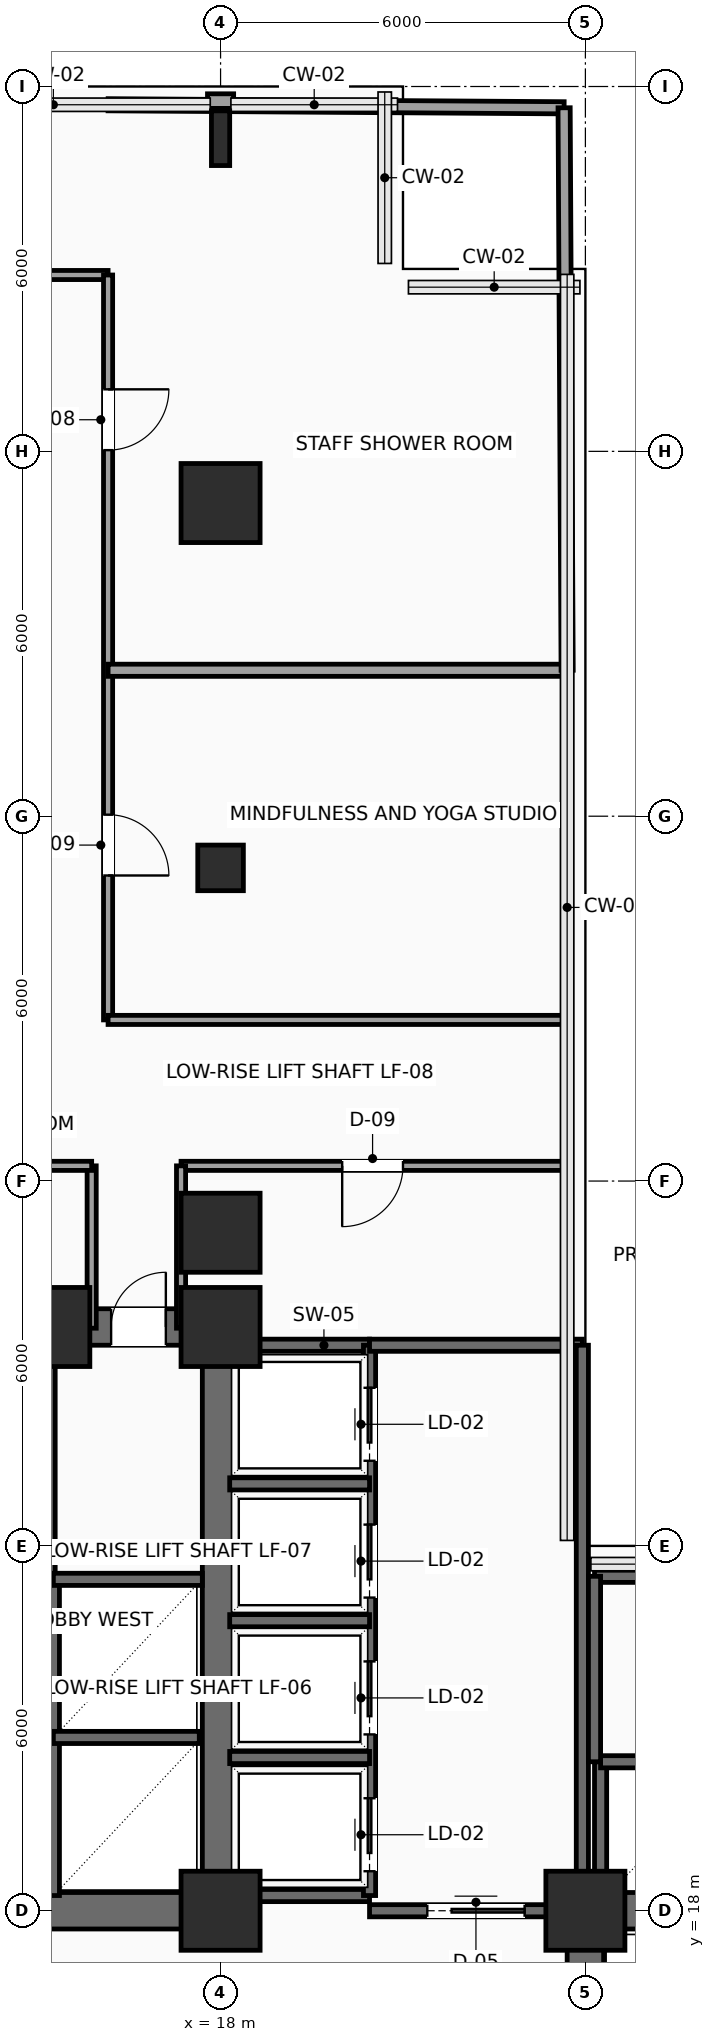
"""IFC4 building model, lengths in metres.
Left out: names, types, materials, properties, quantities, classifications, styles, units other than length and angle.
Written with IfcOpenShell. Run it as: python <this file> out.ifc"""

import sys

from ifc_helpers import new_model, si_unit, direction, frame, frame_2d, origin, origin_2d, place, context, subcontext, project, spatial, rectangle, hollow_rectangle, i_section, extrude, element, fill, save


model = new_model("IFC4")
c1 = context("Model", 3, precision=1e-05, world=origin(), true_north=direction((0.0, 1.0)))
c2 = subcontext(c1, "Body", "Model", "MODEL_VIEW")
j1 = project(units=[si_unit("LENGTHUNIT", "METRE"), si_unit("PLANEANGLEUNIT", "RADIAN")], contexts=[c1])
p1 = place(None, origin())
s1 = spatial("IfcSite", under=j1, at=p1, CompositionType="ELEMENT")
p2 = place(p1, origin())
s2 = spatial("IfcBuilding", under=s1, at=p2, CompositionType="ELEMENT")
p3 = place(p2, frame((0.0, 0.0, 75.3)))
s3 = spatial("IfcBuildingStorey", under=s2, at=p3, CompositionType="ELEMENT", Elevation=75.3)
for number, where, z_axis, x_axis in (
    (1, (18.0, 18.0, 0.0), (0.0, 0.0, 1.0), (1.0, 0.0, 0.0)),
    (2, (15.2, 27.6, 0.0), (0.0, 0.0, 1.0), (1.0, 0.0, 0.0)),
    (3, (18.0, 27.6, 0.0), (0.0, 0.0, 1.0), (1.0, 0.0, 0.0)),
    (4, (24.0, 18.0, 0.0), (0.0, 0.0, 1.0), (1.0, 0.0, 0.0)),
    (5, (18.0, 29.15, 0.0), (0.0, 0.0, 1.0), (1.0, 0.0, 0.0)),
):
    element("IfcColumn", number, at=place(p3, frame(where, z_axis=z_axis, x_axis=x_axis)), inside=s3, PredefinedType="COLUMN", context=c2, shape_type="SweptSolid", body=[
        extrude(rectangle(XDim=1.3, YDim=1.3, at=origin_2d()), origin(), (0.0, 0.0, 1.0), 3.9),
    ])
p4 = place(p3, frame((18.0, 35.15, 0.0), z_axis=(0.0, 0.0, 1.0), x_axis=(1.0, 0.0, 0.0)))
e6 = element("IfcColumn", 6, at=p4, inside=s3, PredefinedType="COLUMN", context=c2, shape_type="SweptSolid", body=[
    extrude(hollow_rectangle(XDim=0.75, YDim=0.75, WallThickness=0.035, InnerFilletRadius=0.035, OuterFilletRadius=0.05, at=origin_2d()), origin(), (0.0, 0.0, 1.0), 3.9),
])
p5 = place(p3, frame((18.0, 41.15, 0.0), z_axis=(0.0, 0.0, 1.0), x_axis=(1.0, 0.0, 0.0)))
e7 = element("IfcColumn", 7, at=p5, inside=s3, PredefinedType="COLUMN", context=c2, shape_type="SweptSolid", body=[
    extrude(rectangle(XDim=1.3, YDim=1.3, at=origin_2d()), origin(), (0.0, 0.0, 1.0), 3.9),
])
p6 = place(p3, frame((18.0, 47.15, 0.0), z_axis=(0.0, 0.0, 1.0), x_axis=(1.0, 0.0, 0.0)))
e8 = element("IfcColumn", 8, at=p6, inside=s3, PredefinedType="COLUMN", context=c2, shape_type="SweptSolid", body=[
    extrude(i_section(OverallWidth=0.3, OverallDepth=0.9, WebThickness=0.019, FlangeThickness=0.035, FilletRadius=0.03, at=origin_2d()), origin(), (0.0, 0.0, 1.0), 3.9),
])
p7 = place(p3, frame((17.785, 47.76, 0.0), z_axis=(0.0, 0.0, 1.0), x_axis=(1.0, 0.0, 0.0)))
e9 = element("IfcWall", 9, at=p7, inside=s3, PredefinedType="SOLIDWALL", context=c2, shape_type="SweptSolid", body=[
    extrude(rectangle(XDim=0.43, YDim=0.24, at=frame_2d((0.215, 0.0))), origin(), (0.0, 0.0, 1.0), 3.65),
])
p8 = place(p3, frame((6.0, 18.0, 0.0), z_axis=(0.0, 0.0, 1.0), x_axis=(1.0, 0.0, 0.0)))
e10 = element("IfcWall", 10, at=p8, inside=s3, PredefinedType="SHEAR", context=c2, shape_type="SweptSolid", body=[
    extrude(rectangle(XDim=12.0, YDim=0.6, at=frame_2d((6.0, 0.0))), origin(), (0.0, 0.0, 1.0), 3.65),
])
p9 = place(p8, frame((7.15, 0.0, 0.0)))
e11 = element("IfcOpeningElement", 11, at=p9, cuts=e10, PredefinedType="OPENING", context=c2, shape_type="SweptSolid", body=[
    extrude(rectangle(XDim=1.6, YDim=2.3, at=frame_2d((0.8, 1.15))), frame((0.0, 0.31, 0.0), z_axis=(0.0, -1.0, 0.0), x_axis=(1.0, 0.0, 0.0)), (0.0, 0.0, 1.0), 0.62),
])
p10 = place(p3, frame((6.0, 27.6, 0.0), z_axis=(0.0, 0.0, 1.0), x_axis=(1.0, 0.0, 0.0)))
e12 = element("IfcWall", 12, at=p10, inside=s3, PredefinedType="SHEAR", context=c2, shape_type="SweptSolid", body=[
    extrude(rectangle(XDim=12.0, YDim=0.6, at=frame_2d((6.0, 0.0))), origin(), (0.0, 0.0, 1.0), 3.65),
])
p11 = place(p10, frame((10.2, 0.0, 0.0)))
e13 = element("IfcOpeningElement", 13, at=p11, cuts=e12, PredefinedType="OPENING", context=c2, shape_type="SweptSolid", body=[
    extrude(rectangle(XDim=0.9, YDim=2.15, at=frame_2d((0.45, 1.075))), frame((0.0, 0.31, 0.0), z_axis=(0.0, -1.0, 0.0), x_axis=(1.0, 0.0, 0.0)), (0.0, 0.0, 1.0), 0.62),
])
for number, where, z_axis, x_axis in (
    (14, (18.0, 18.0, 0.0), (0.0, 0.0, 1.0), (0.0, 1.0, 0.0)),
    (15, (24.0, 18.0, 0.0), (0.0, 0.0, 1.0), (1.0, 0.0, 0.0)),
):
    element("IfcWall", number, at=place(p3, frame(where, z_axis=z_axis, x_axis=x_axis)), inside=s3, PredefinedType="SHEAR", context=c2, shape_type="SweptSolid", body=[
        extrude(rectangle(XDim=9.6, YDim=0.6, at=frame_2d((4.8, 0.0))), origin(), (0.0, 0.0, 1.0), 3.65),
    ])
p12 = place(p3, frame((24.0, 6.0, 0.0), z_axis=(0.0, 0.0, 1.0), x_axis=(0.0, 1.0, 0.0)))
e16 = element("IfcWall", 16, at=p12, inside=s3, PredefinedType="SHEAR", context=c2, shape_type="SweptSolid", body=[
    extrude(rectangle(XDim=12.0, YDim=0.6, at=frame_2d((6.0, 0.0))), origin(), (0.0, 0.0, 1.0), 3.65),
])
p13 = place(p12, frame((7.15, 0.0, 0.0)))
e17 = element("IfcOpeningElement", 17, at=p13, cuts=e16, PredefinedType="OPENING", context=c2, shape_type="SweptSolid", body=[
    extrude(rectangle(XDim=1.6, YDim=2.3, at=frame_2d((0.8, 1.15))), frame((0.0, 0.31, 0.0), z_axis=(0.0, -1.0, 0.0), x_axis=(1.0, 0.0, 0.0)), (0.0, 0.0, 1.0), 0.62),
])
p14 = place(p3, frame((15.18, 23.26, 0.0), z_axis=(0.0, 0.0, 1.0), x_axis=(0.0, 1.0, 0.0)))
e18 = element("IfcWall", 18, at=p14, inside=s3, PredefinedType="SHEAR", context=c2, shape_type="SweptSolid", body=[
    extrude(rectangle(XDim=4.04, YDim=0.2, at=frame_2d((2.02, 0.0))), origin(), (0.0, 0.0, 1.0), 3.65),
])
p15 = place(p3, frame((15.25, 18.25, 0.0), z_axis=(0.0, 0.0, 1.0), x_axis=(0.0, 1.0, 0.0)))
e19 = element("IfcWall", 19, at=p15, inside=s3, PredefinedType="SHEAR", context=c2, shape_type="SweptSolid", body=[
    extrude(rectangle(XDim=5.2, YDim=0.2, at=frame_2d((2.6, 0.0))), origin(), (0.0, 0.0, 1.0), 3.65),
])
p16 = place(p3, frame((15.25, 20.85, 0.0), z_axis=(0.0, 0.0, 1.0), x_axis=(1.0, 0.0, 0.0)))
e20 = element("IfcWall", 20, at=p16, inside=s3, PredefinedType="SHEAR", context=c2, shape_type="SweptSolid", body=[
    extrude(rectangle(XDim=2.4, YDim=0.2, at=frame_2d((1.2, 0.0))), origin(), (0.0, 0.0, 1.0), 3.65),
])
p17 = place(p3, frame((15.25, 23.45, 0.0), z_axis=(0.0, 0.0, 1.0), x_axis=(1.0, 0.0, 0.0)))
e21 = element("IfcWall", 21, at=p17, inside=s3, PredefinedType="SHEAR", context=c2, shape_type="SweptSolid", body=[
    extrude(rectangle(XDim=2.45, YDim=0.2, at=frame_2d((1.225, 0.0))), origin(), (0.0, 0.0, 1.0), 3.65),
])
for number, where, z_axis, x_axis in (
    (22, (18.1, 27.3, 0.0), (0.0, 0.0, 1.0), (1.0, 0.0, 0.0)),
    (23, (18.1, 18.25, 0.0), (0.0, 0.0, 1.0), (1.0, 0.0, 0.0)),
):
    element("IfcWall", number, at=place(p3, frame(where, z_axis=z_axis, x_axis=x_axis)), inside=s3, PredefinedType="SHEAR", context=c2, shape_type="SweptSolid", body=[
        extrude(rectangle(XDim=2.35, YDim=0.2, at=frame_2d((1.175, 0.0))), origin(), (0.0, 0.0, 1.0), 3.65),
    ])
p18 = place(p3, frame((20.45, 18.25, 0.0), z_axis=(0.0, 0.0, 1.0), x_axis=(0.0, 1.0, 0.0)))
e24 = element("IfcWall", 24, at=p18, inside=s3, PredefinedType="SHEAR", context=c2, shape_type="SweptSolid", body=[
    extrude(rectangle(XDim=9.05, YDim=0.2, at=frame_2d((4.525, 0.0))), origin(), (0.0, 0.0, 1.0), 3.65),
])
p19 = place(p18, frame((0.4, 0.0, 0.0)))
e25 = element("IfcOpeningElement", 25, at=p19, cuts=e24, PredefinedType="OPENING", context=c2, shape_type="SweptSolid", body=[
    extrude(rectangle(XDim=1.2, YDim=2.2, at=frame_2d((0.6, 1.1))), frame((0.0, 0.11, 0.0), z_axis=(0.0, -1.0, 0.0), x_axis=(1.0, 0.0, 0.0)), (0.0, 0.0, 1.0), 0.22),
])
p20 = place(p18, frame((2.65, 0.0, 0.0)))
e26 = element("IfcOpeningElement", 26, at=p20, cuts=e24, PredefinedType="OPENING", context=c2, shape_type="SweptSolid", body=[
    extrude(rectangle(XDim=1.2, YDim=2.2, at=frame_2d((0.6, 1.1))), frame((0.0, 0.11, 0.0), z_axis=(0.0, -1.0, 0.0), x_axis=(1.0, 0.0, 0.0)), (0.0, 0.0, 1.0), 0.22),
])
p21 = place(p18, frame((4.9, 0.0, 0.0)))
e27 = element("IfcOpeningElement", 27, at=p21, cuts=e24, PredefinedType="OPENING", context=c2, shape_type="SweptSolid", body=[
    extrude(rectangle(XDim=1.2, YDim=2.2, at=frame_2d((0.6, 1.1))), frame((0.0, 0.11, 0.0), z_axis=(0.0, -1.0, 0.0), x_axis=(1.0, 0.0, 0.0)), (0.0, 0.0, 1.0), 0.22),
])
p22 = place(p18, frame((7.15, 0.0, 0.0)))
e28 = element("IfcOpeningElement", 28, at=p22, cuts=e24, PredefinedType="OPENING", context=c2, shape_type="SweptSolid", body=[
    extrude(rectangle(XDim=1.2, YDim=2.2, at=frame_2d((0.6, 1.1))), frame((0.0, 0.11, 0.0), z_axis=(0.0, -1.0, 0.0), x_axis=(1.0, 0.0, 0.0)), (0.0, 0.0, 1.0), 0.22),
])
for number, where, z_axis, x_axis in (
    (29, (18.15, 20.52, 0.0), (0.0, 0.0, 1.0), (1.0, 0.0, 0.0)),
    (30, (18.15, 22.77, 0.0), (0.0, 0.0, 1.0), (1.0, 0.0, 0.0)),
    (31, (18.15, 25.02, 0.0), (0.0, 0.0, 1.0), (1.0, 0.0, 0.0)),
):
    element("IfcWall", number, at=place(p3, frame(where, z_axis=z_axis, x_axis=x_axis)), inside=s3, PredefinedType="SHEAR", context=c2, shape_type="SweptSolid", body=[
        extrude(rectangle(XDim=2.3, YDim=0.2, at=frame_2d((1.15, 0.0))), origin(), (0.0, 0.0, 1.0), 3.65),
    ])
p23 = place(p3, frame((20.45, 18.0, 0.0), z_axis=(0.0, 0.0, 1.0), x_axis=(1.0, 0.0, 0.0)))
e32 = element("IfcWall", 32, at=p23, inside=s3, PredefinedType="SHEAR", context=c2, shape_type="SweptSolid", body=[
    extrude(rectangle(XDim=3.5, YDim=0.2, at=frame_2d((1.75, 0.0))), origin(), (0.0, 0.0, 1.0), 3.65),
])
p24 = place(p23, frame((0.95, 0.0, 0.0)))
e33 = element("IfcOpeningElement", 33, at=p24, cuts=e32, PredefinedType="OPENING", context=c2, shape_type="SweptSolid", body=[
    extrude(rectangle(XDim=1.6, YDim=2.3, at=frame_2d((0.8, 1.15))), frame((0.0, 0.11, 0.0), z_axis=(0.0, -1.0, 0.0), x_axis=(1.0, 0.0, 0.0)), (0.0, 0.0, 1.0), 0.22),
])
p25 = place(p3, frame((20.45, 27.3, 0.0), z_axis=(0.0, 0.0, 1.0), x_axis=(1.0, 0.0, 0.0)))
e34 = element("IfcWall", 34, at=p25, inside=s3, PredefinedType="SHEAR", context=c2, shape_type="SweptSolid", body=[
    extrude(rectangle(XDim=3.5, YDim=0.2, at=frame_2d((1.75, 0.0))), origin(), (0.0, 0.0, 1.0), 3.65),
])
p26 = place(p3, frame((23.95, 18.0, 0.0), z_axis=(0.0, 0.0, 1.0), x_axis=(0.0, 1.0, 0.0)))
e35 = element("IfcWall", 35, at=p26, inside=s3, PredefinedType="SHEAR", context=c2, shape_type="SweptSolid", body=[
    extrude(rectangle(XDim=9.3, YDim=0.2, at=frame_2d((4.65, 0.0))), origin(), (0.0, 0.0, 1.0), 3.65),
])
p27 = place(p3, frame((24.25, 18.1, 0.0), z_axis=(0.0, 0.0, 1.0), x_axis=(0.0, 1.0, 0.0)))
e36 = element("IfcWall", 36, at=p27, inside=s3, PredefinedType="SHEAR", context=c2, shape_type="SweptSolid", body=[
    extrude(rectangle(XDim=2.35, YDim=0.2, at=frame_2d((1.175, 0.0))), origin(), (0.0, 0.0, 1.0), 3.65),
])
p28 = place(p3, frame((24.25, 20.45, 0.0), z_axis=(0.0, 0.0, 1.0), x_axis=(1.0, 0.0, 0.0)))
e37 = element("IfcWall", 37, at=p28, inside=s3, PredefinedType="SHEAR", context=c2, shape_type="SweptSolid", body=[
    extrude(rectangle(XDim=9.05, YDim=0.2, at=frame_2d((4.525, 0.0))), origin(), (0.0, 0.0, 1.0), 3.65),
])
p29 = place(p3, frame((24.15, 23.5, 0.0), z_axis=(0.0, 0.0, 1.0), x_axis=(1.0, 0.0, 0.0)))
e38 = element("IfcWall", 38, at=p29, inside=s3, PredefinedType="SHEAR", context=c2, shape_type="SweptSolid", body=[
    extrude(rectangle(XDim=9.15, YDim=0.2, at=frame_2d((4.575, 0.0))), origin(), (0.0, 0.0, 1.0), 3.65),
])
p30 = place(p3, frame((24.15, 20.45, 0.0), z_axis=(0.0, 0.0, 1.0), x_axis=(0.0, 1.0, 0.0)))
e39 = element("IfcWall", 39, at=p30, inside=s3, PredefinedType="SHEAR", context=c2, shape_type="SweptSolid", body=[
    extrude(rectangle(XDim=3.05, YDim=0.2, at=frame_2d((1.525, 0.0))), origin(), (0.0, 0.0, 1.0), 3.65),
])
p31 = place(p3, frame((13.8, 44.9, 0.0), z_axis=(0.0, 0.0, 1.0), x_axis=(1.0, 0.0, 0.0)))
e40 = element("IfcWall", 40, at=p31, inside=s3, PredefinedType="PARTITIONING", context=c2, shape_type="SweptSolid", body=[
    extrude(rectangle(XDim=2.35, YDim=0.15, at=frame_2d((1.175, 0.0))), origin(), (0.0, 0.0, 1.0), 3.65),
])
p32 = place(p3, frame((16.15, 44.9, 0.0), z_axis=(0.0, 0.0, 1.0), x_axis=(0.0, -1.0, 0.0)))
e41 = element("IfcWall", 41, at=p32, inside=s3, PredefinedType="PARTITIONING", context=c2, shape_type="SweptSolid", body=[
    extrude(rectangle(XDim=12.25, YDim=0.15, at=frame_2d((6.125, 0.0))), origin(), (0.0, 0.0, 1.0), 3.65),
])
p33 = place(p32, frame((8.875, 0.0, 0.0)))
e42 = element("IfcOpeningElement", 42, at=p33, cuts=e41, PredefinedType="OPENING", context=c2, shape_type="SweptSolid", body=[
    extrude(rectangle(XDim=1.0, YDim=2.2, at=frame_2d((0.5, 1.1))), frame((0.0, 0.085, 0.0), z_axis=(0.0, -1.0, 0.0), x_axis=(1.0, 0.0, 0.0)), (0.0, 0.0, 1.0), 0.17),
])
p34 = place(p32, frame((1.88, 0.0, 0.0)))
e43 = element("IfcOpeningElement", 43, at=p34, cuts=e41, PredefinedType="OPENING", context=c2, shape_type="SweptSolid", body=[
    extrude(rectangle(XDim=1.0, YDim=2.2, at=frame_2d((0.5, 1.1))), frame((0.0, 0.085, 0.0), z_axis=(0.0, -1.0, 0.0), x_axis=(1.0, 0.0, 0.0)), (0.0, 0.0, 1.0), 0.17),
])
p35 = place(p3, frame((16.15, 32.65, 0.0), z_axis=(0.0, 0.0, 1.0), x_axis=(1.0, 0.0, 0.0)))
e44 = element("IfcWall", 44, at=p35, inside=s3, PredefinedType="PARTITIONING", context=c2, shape_type="SweptSolid", body=[
    extrude(rectangle(XDim=7.55, YDim=0.15, at=frame_2d((3.775, 0.0))), origin(), (0.0, 0.0, 1.0), 3.65),
])
p36 = place(p3, frame((23.7, 30.25, 0.0), z_axis=(0.0, 0.0, 1.0), x_axis=(-1.0, 0.0, 0.0)))
e45 = element("IfcWall", 45, at=p36, inside=s3, PredefinedType="PARTITIONING", context=c2, shape_type="SweptSolid", body=[
    extrude(rectangle(XDim=6.35, YDim=0.15, at=frame_2d((3.175, 0.0))), origin(), (0.0, 0.0, 1.0), 3.65),
])
p37 = place(p36, frame((2.7, 0.0, 0.0)))
e46 = element("IfcOpeningElement", 46, at=p37, cuts=e45, PredefinedType="OPENING", context=c2, shape_type="SweptSolid", body=[
    extrude(rectangle(XDim=1.0, YDim=2.2, at=frame_2d((0.5, 1.1))), frame((0.0, 0.085, 0.0), z_axis=(0.0, -1.0, 0.0), x_axis=(1.0, 0.0, 0.0)), (0.0, 0.0, 1.0), 0.17),
])
for number, where, z_axis, x_axis in (
    (47, (17.35, 30.25, 0.0), (0.0, 0.0, 1.0), (0.0, -1.0, 0.0)),
    (48, (15.88, 27.58, 0.0), (0.0, 0.0, 1.0), (0.0, 1.0, 0.0)),
):
    element("IfcWall", number, at=place(p3, frame(where, z_axis=z_axis, x_axis=x_axis)), inside=s3, PredefinedType="PARTITIONING", context=c2, shape_type="SweptSolid", body=[
        extrude(rectangle(XDim=2.67, YDim=0.15, at=frame_2d((1.335, 0.0))), origin(), (0.0, 0.0, 1.0), 3.65),
    ])
p38 = place(p3, frame((15.88, 30.25, 0.0), z_axis=(0.0, 0.0, 1.0), x_axis=(-1.0, 0.0, 0.0)))
e49 = element("IfcWall", 49, at=p38, inside=s3, PredefinedType="PARTITIONING", context=c2, shape_type="SweptSolid", body=[
    extrude(rectangle(XDim=10.63, YDim=0.15, at=frame_2d((5.315, 0.0))), origin(), (0.0, 0.0, 1.0), 3.65),
])
p39 = place(p38, frame((6.13, 0.0, 0.0)))
e50 = element("IfcOpeningElement", 50, at=p39, cuts=e49, PredefinedType="OPENING", context=c2, shape_type="SweptSolid", body=[
    extrude(rectangle(XDim=0.9, YDim=2.1, at=frame_2d((0.45, 1.05))), frame((0.0, 0.085, 0.0), z_axis=(0.0, -1.0, 0.0), x_axis=(1.0, 0.0, 0.0)), (0.0, 0.0, 1.0), 0.17),
])
p40 = place(p3, frame((16.15, 38.4, 0.0), z_axis=(0.0, 0.0, 1.0), x_axis=(1.0, 0.0, 0.0)))
e51 = element("IfcWall", 51, at=p40, inside=s3, PredefinedType="PARTITIONING", context=c2, shape_type="SweptSolid", body=[
    extrude(rectangle(XDim=7.55, YDim=0.2, at=frame_2d((3.775, 0.0))), origin(), (0.0, 0.0, 1.0), 3.142),
])
p41 = place(p3, frame((16.15, 47.7, 0.0), z_axis=(0.0, 0.0, 1.0), x_axis=(0.999978417552, -0.006569964219, 0.0)))
e52 = element("IfcWall", 52, at=p41, inside=s3, PredefinedType="PARTITIONING", context=c2, shape_type="SweptSolid", body=[
    extrude(rectangle(XDim=1.635, YDim=0.2, at=frame_2d((0.817, 0.0))), origin(), (0.0, 0.0, 1.0), 3.65),
])
p42 = place(p3, frame((18.215, 47.686, 0.0), z_axis=(0.0, 0.0, 1.0), x_axis=(0.999977600485, -0.006693170229, 0.0)))
e53 = element("IfcWall", 53, at=p42, inside=s3, PredefinedType="PARTITIONING", context=c2, shape_type="SweptSolid", body=[
    extrude(rectangle(XDim=5.435, YDim=0.2, at=frame_2d((2.717, 0.0))), origin(), (0.0, 0.0, 1.0), 3.65),
])
p43 = place(p3, frame((23.7, 38.4, 0.0), z_axis=(0.0, 0.0, 1.0), x_axis=(-0.005410604923, 0.99998536257, 0.0)))
e54 = element("IfcWall", 54, at=p43, inside=s3, PredefinedType="PARTITIONING", context=c2, shape_type="SweptSolid", body=[
    extrude(rectangle(XDim=9.25, YDim=0.2, at=frame_2d((4.625, 0.0))), origin(), (0.0, 0.0, 1.0), 3.65),
])
p44 = place(p11, origin())
e55 = element("IfcDoor", 55, at=p44, inside=s3, OperationType="SINGLE_SWING_RIGHT", PredefinedType="DOOR", context=c2, shape_type="SweptSolid", body=[
    extrude(rectangle(XDim=0.9, YDim=2.15, at=frame_2d((0.45, 1.075))), frame((0.0, 0.025, 0.0), z_axis=(0.0, -1.0, 0.0), x_axis=(1.0, 0.0, 0.0)), (0.0, 0.0, 1.0), 0.05),
])
fill(e13, e55)
p45 = place(p19, origin())
e56 = element("IfcDoor", 56, at=p45, inside=s3, OperationType="SLIDING_TO_RIGHT", PredefinedType="DOOR", context=c2, shape_type="SweptSolid", body=[
    extrude(rectangle(XDim=1.2, YDim=2.2, at=frame_2d((0.6, 1.1))), frame((0.0, 0.025, 0.0), z_axis=(0.0, -1.0, 0.0), x_axis=(1.0, 0.0, 0.0)), (0.0, 0.0, 1.0), 0.05),
])
fill(e25, e56)
p46 = place(p20, origin())
e57 = element("IfcDoor", 57, at=p46, inside=s3, OperationType="SLIDING_TO_RIGHT", PredefinedType="DOOR", context=c2, shape_type="SweptSolid", body=[
    extrude(rectangle(XDim=1.2, YDim=2.2, at=frame_2d((0.6, 1.1))), frame((0.0, 0.025, 0.0), z_axis=(0.0, -1.0, 0.0), x_axis=(1.0, 0.0, 0.0)), (0.0, 0.0, 1.0), 0.05),
])
fill(e26, e57)
p47 = place(p21, origin())
e58 = element("IfcDoor", 58, at=p47, inside=s3, OperationType="SLIDING_TO_RIGHT", PredefinedType="DOOR", context=c2, shape_type="SweptSolid", body=[
    extrude(rectangle(XDim=1.2, YDim=2.2, at=frame_2d((0.6, 1.1))), frame((0.0, 0.025, 0.0), z_axis=(0.0, -1.0, 0.0), x_axis=(1.0, 0.0, 0.0)), (0.0, 0.0, 1.0), 0.05),
])
fill(e27, e58)
p48 = place(p22, origin())
e59 = element("IfcDoor", 59, at=p48, inside=s3, OperationType="SLIDING_TO_RIGHT", PredefinedType="DOOR", context=c2, shape_type="SweptSolid", body=[
    extrude(rectangle(XDim=1.2, YDim=2.2, at=frame_2d((0.6, 1.1))), frame((0.0, 0.025, 0.0), z_axis=(0.0, -1.0, 0.0), x_axis=(1.0, 0.0, 0.0)), (0.0, 0.0, 1.0), 0.05),
])
fill(e28, e59)
p49 = place(p24, origin())
e60 = element("IfcDoor", 60, at=p49, inside=s3, OperationType="DOUBLE_DOOR_SLIDING", PredefinedType="DOOR", context=c2, shape_type="SweptSolid", body=[
    extrude(rectangle(XDim=1.6, YDim=2.3, at=frame_2d((0.8, 1.15))), frame((0.0, 0.025, 0.0), z_axis=(0.0, -1.0, 0.0), x_axis=(1.0, 0.0, 0.0)), (0.0, 0.0, 1.0), 0.05),
])
fill(e33, e60)
p50 = place(p33, origin())
e61 = element("IfcDoor", 61, at=p50, inside=s3, OperationType="SINGLE_SWING_RIGHT", PredefinedType="DOOR", context=c2, shape_type="SweptSolid", body=[
    extrude(rectangle(XDim=1.0, YDim=2.2, at=frame_2d((0.5, 1.1))), frame((0.0, 0.025, 0.0), z_axis=(0.0, -1.0, 0.0), x_axis=(1.0, 0.0, 0.0)), (0.0, 0.0, 1.0), 0.05),
])
fill(e42, e61)
p51 = place(p34, origin())
e62 = element("IfcDoor", 62, at=p51, inside=s3, OperationType="SINGLE_SWING_LEFT", PredefinedType="DOOR", context=c2, shape_type="SweptSolid", body=[
    extrude(rectangle(XDim=1.0, YDim=2.2, at=frame_2d((0.5, 1.1))), frame((0.0, 0.025, 0.0), z_axis=(0.0, -1.0, 0.0), x_axis=(1.0, 0.0, 0.0)), (0.0, 0.0, 1.0), 0.05),
])
fill(e43, e62)
p52 = place(p37, origin())
e63 = element("IfcDoor", 63, at=p52, inside=s3, OperationType="SINGLE_SWING_RIGHT", PredefinedType="DOOR", context=c2, shape_type="SweptSolid", body=[
    extrude(rectangle(XDim=1.0, YDim=2.2, at=frame_2d((0.5, 1.1))), frame((0.0, 0.025, 0.0), z_axis=(0.0, -1.0, 0.0), x_axis=(1.0, 0.0, 0.0)), (0.0, 0.0, 1.0), 0.05),
])
fill(e46, e63)
save(model, sys.argv[1])
